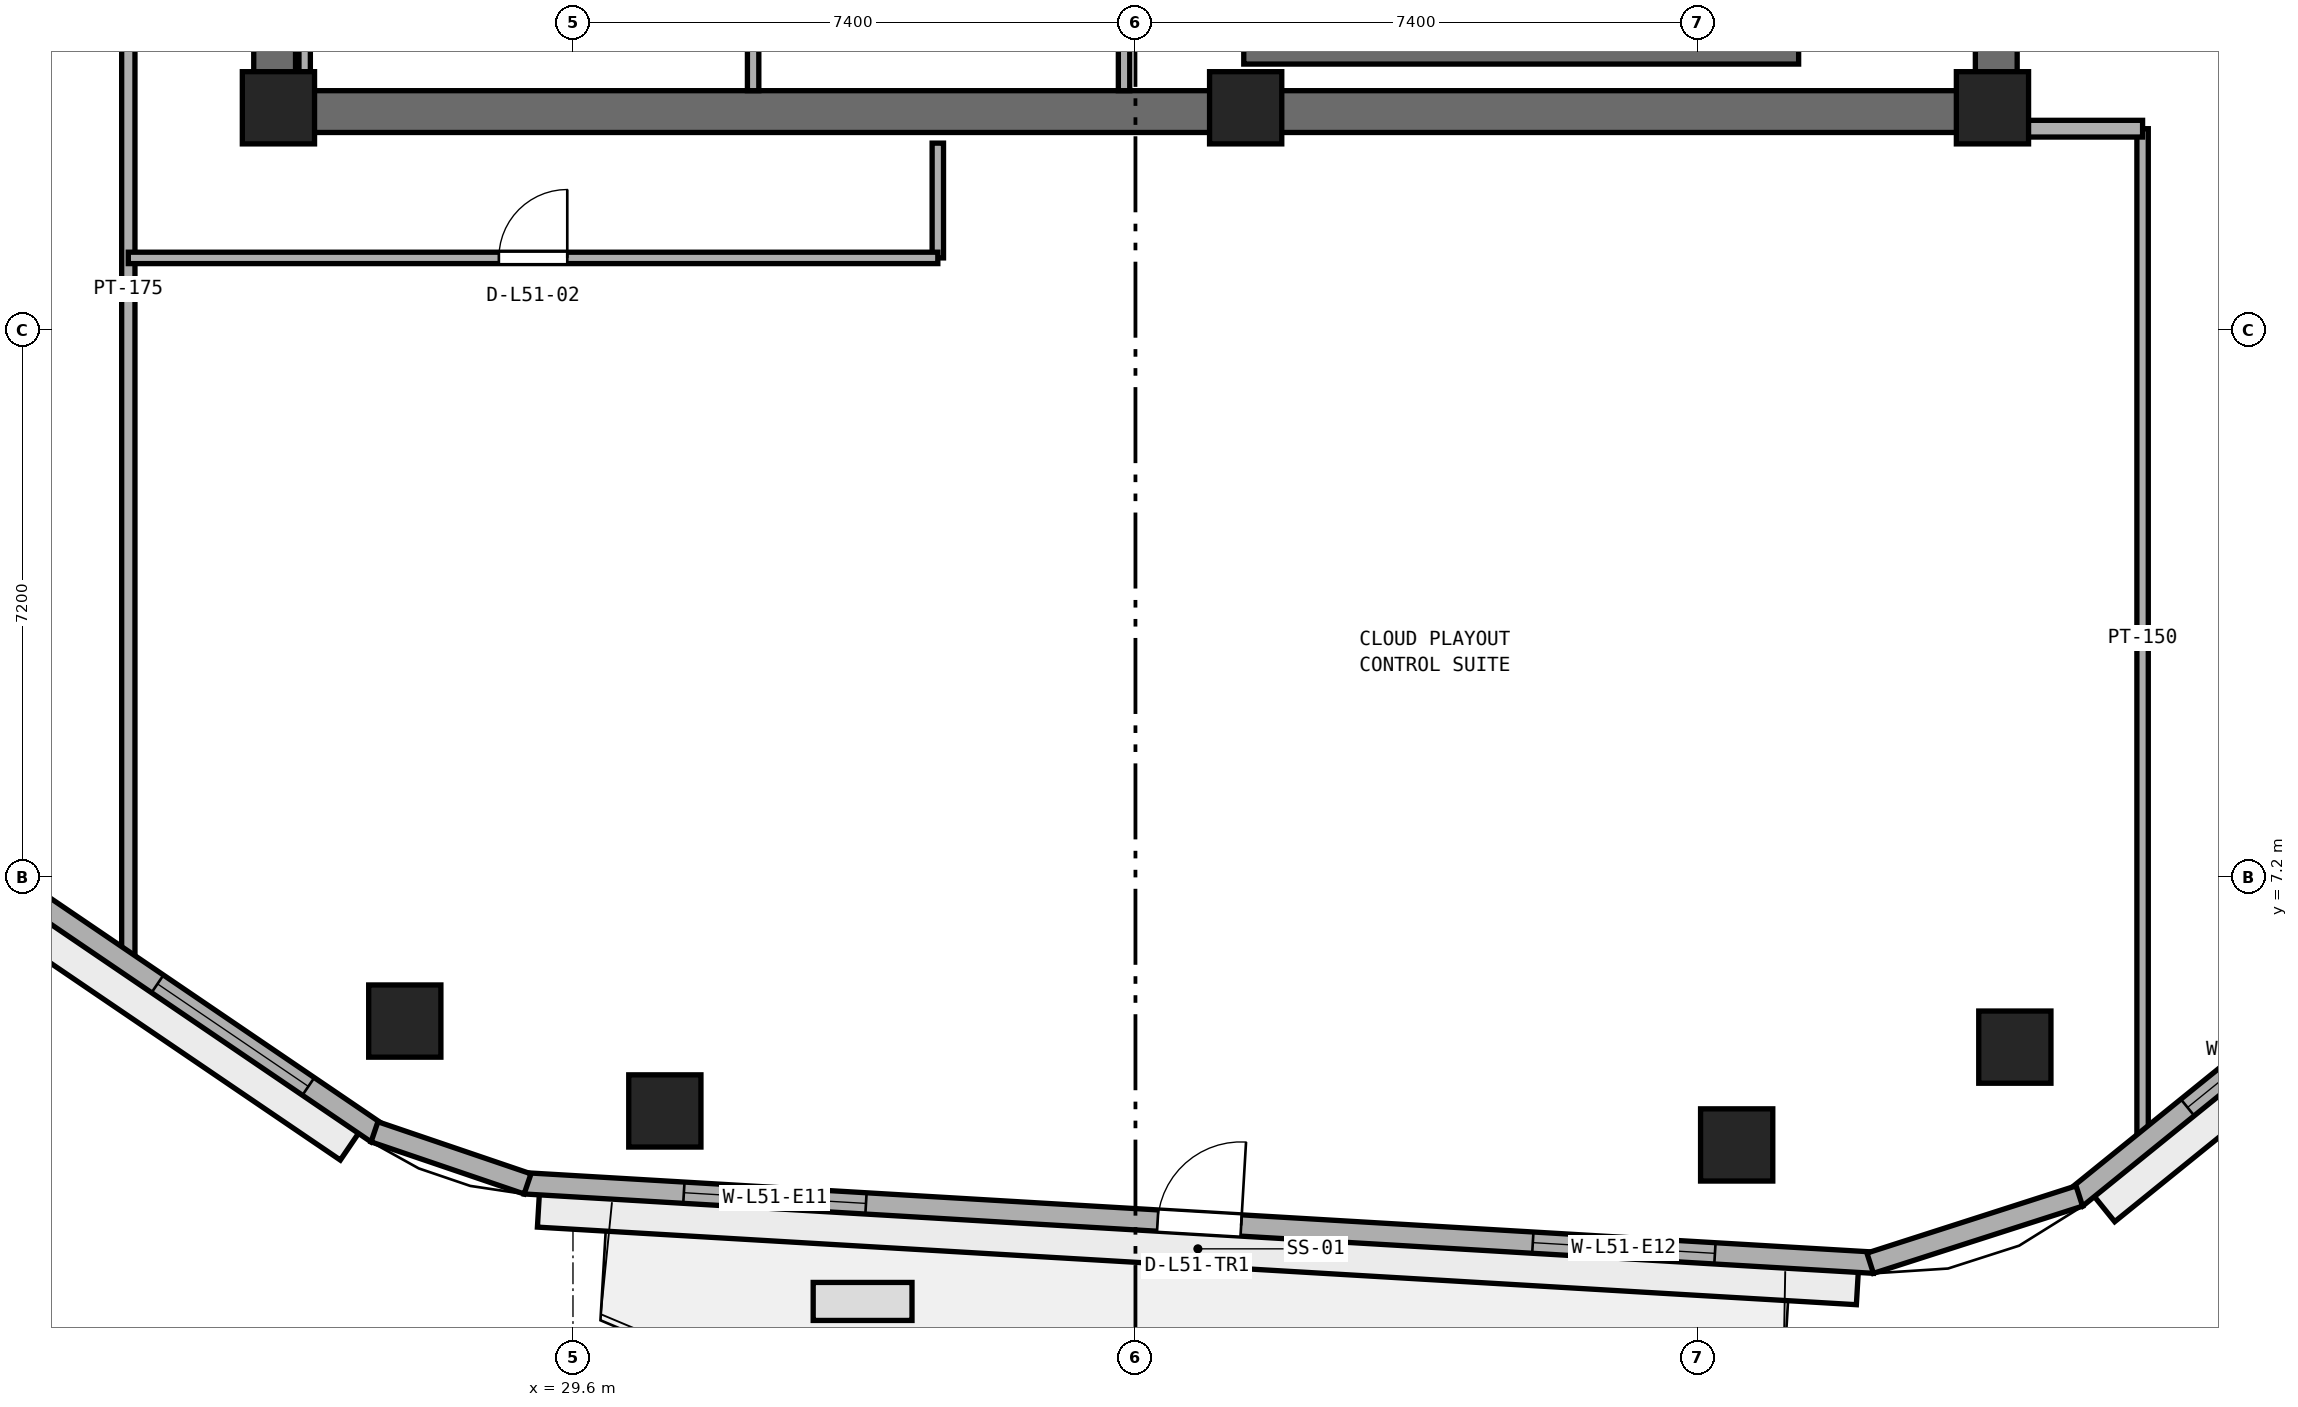
"""IFC4 building model, lengths in metres.
Left out: names, types, materials, properties, quantities, classifications, styles, units other than length and angle.
Written with IfcOpenShell. Run it as: python <this file> out.ifc"""

import sys

from ifc_helpers import new_model, si_unit, direction, frame, frame_2d, origin, origin_2d, place, context, subcontext, project, spatial, rectangle, extrude, element, fill, save


model = new_model("IFC4")
c1 = context("Model", 3, precision=1e-05, world=origin(), true_north=direction((0.0, 1.0)))
c2 = subcontext(c1, "Body", "Model", "MODEL_VIEW")
j1 = project(units=[si_unit("LENGTHUNIT", "METRE"), si_unit("PLANEANGLEUNIT", "RADIAN")], contexts=[c1])
p1 = place(None, origin())
s1 = spatial("IfcSite", under=j1, at=p1, CompositionType="ELEMENT")
p2 = place(p1, origin())
s2 = spatial("IfcBuilding", under=s1, at=p2, CompositionType="ELEMENT")
p3 = place(p2, frame((0.0, 0.0, 201.0)))
s3 = spatial("IfcBuildingStorey", under=s2, at=p3, CompositionType="ELEMENT", Elevation=201.0)
p4 = place(p3, frame((25.4, 17.275, 0.0), z_axis=(0.0, 0.0, 1.0), x_axis=(1.0, 0.0, 0.0)))
e1 = element("IfcWall", 1, at=p4, inside=s3, PredefinedType="SHEAR", context=c2, shape_type="SweptSolid", body=[
    extrude(rectangle(XDim=23.2, YDim=0.55, at=frame_2d((11.6, 0.0))), origin(), (0.0, 0.0, 1.0), 3.54),
])
p5 = place(p3, frame((25.675, 17.55, 0.0), z_axis=(0.0, 0.0, 1.0), x_axis=(0.0, 1.0, 0.0)))
e2 = element("IfcWall", 2, at=p5, inside=s3, PredefinedType="SHEAR", context=c2, shape_type="SweptSolid", body=[
    extrude(rectangle(XDim=15.3, YDim=0.55, at=frame_2d((7.65, 0.0))), origin(), (0.0, 0.0, 1.0), 3.54),
])
p6 = place(p5, frame((6.9, 0.0, 0.0)))
e3 = element("IfcOpeningElement", 3, at=p6, cuts=e2, PredefinedType="OPENING", context=c2, shape_type="SweptSolid", body=[
    extrude(rectangle(XDim=1.5, YDim=2.15, at=frame_2d((0.75, 1.075))), frame((0.0, 0.285, 0.0), z_axis=(0.0, -1.0, 0.0), x_axis=(1.0, 0.0, 0.0)), (0.0, 0.0, 1.0), 0.57),
])
p7 = place(p3, frame((48.325, 17.55, 0.0), z_axis=(0.0, 0.0, 1.0), x_axis=(0.0, 1.0, 0.0)))
e4 = element("IfcWall", 4, at=p7, inside=s3, PredefinedType="SHEAR", context=c2, shape_type="SweptSolid", body=[
    extrude(rectangle(XDim=15.3, YDim=0.55, at=frame_2d((7.65, 0.0))), origin(), (0.0, 0.0, 1.0), 3.54),
])
p8 = place(p7, frame((5.75, 0.0, 0.0)))
e5 = element("IfcOpeningElement", 5, at=p8, cuts=e4, PredefinedType="OPENING", context=c2, shape_type="SweptSolid", body=[
    extrude(rectangle(XDim=1.5, YDim=2.15, at=frame_2d((0.75, 1.075))), frame((0.0, 0.285, 0.0), z_axis=(0.0, -1.0, 0.0), x_axis=(1.0, 0.0, 0.0)), (0.0, 0.0, 1.0), 0.57),
])
for number, where, z_axis, x_axis in (
    (6, (25.725, 17.325, 0.0), (0.0, 0.0, 1.0), (1.0, 0.0, 0.0)),
    (7, (38.45, 17.325, 0.0), (0.0, 0.0, 1.0), (1.0, 0.0, 0.0)),
    (8, (48.275, 17.325, 0.0), (0.0, 0.0, 1.0), (1.0, 0.0, 0.0)),
):
    element("IfcColumn", number, at=place(p3, frame(where, z_axis=z_axis, x_axis=x_axis)), inside=s3, PredefinedType="PILASTER", context=c2, shape_type="SweptSolid", body=[
        extrude(rectangle(XDim=0.95, YDim=0.95, at=origin_2d()), origin(), (0.0, 0.0, 1.0), 3.8),
    ])
for number, where, z_axis, x_axis in (
    (9, (30.809, 4.127, 0.0), (0.0, 0.0, 1.0), (1.0, 0.0, 0.0)),
    (10, (44.91, 3.68, 0.0), (0.0, 0.0, 1.0), (1.0, 0.0, 0.0)),
    (11, (48.57, 4.967, 0.0), (0.0, 0.0, 1.0), (1.0, 0.0, 0.0)),
    (12, (27.387, 5.31, 0.0), (0.0, 0.0, 1.0), (1.0, 0.0, 0.0)),
):
    element("IfcColumn", number, at=place(p3, frame(where, z_axis=z_axis, x_axis=x_axis)), inside=s3, PredefinedType="COLUMN", context=c2, shape_type="SweptSolid", body=[
        extrude(rectangle(XDim=0.95, YDim=0.95, at=origin_2d()), origin(), (0.0, 0.0, 1.0), 3.8),
    ])
p9 = place(p3, frame((38.425, 18.025, 0.0), z_axis=(0.0, 0.0, 1.0), x_axis=(1.0, 0.0, 0.0)))
e13 = element("IfcWall", 13, at=p9, inside=s3, PredefinedType="SHEAR", context=c2, shape_type="SweptSolid", body=[
    extrude(rectangle(XDim=7.3, YDim=0.25, at=frame_2d((3.65, 0.0))), origin(), (0.0, 0.0, 1.0), 3.54),
])
p10 = place(p3, frame((26.07, 17.55, 0.0), z_axis=(0.0, 0.0, 1.0), x_axis=(0.0, 1.0, 0.0)))
e14 = element("IfcWall", 14, at=p10, inside=s3, PredefinedType="PARTITIONING", context=c2, shape_type="SweptSolid", body=[
    extrude(rectangle(XDim=2.2, YDim=0.15, at=frame_2d((1.1, 0.0))), origin(), (0.0, 0.0, 1.0), 2.64),
])
for number, where, z_axis, x_axis in (
    (15, (31.97, 17.55, 0.0), (0.0, 0.0, 1.0), (0.0, 1.0, 0.0)),
    (16, (36.85, 17.55, 0.0), (0.0, 0.0, 1.0), (0.0, 1.0, 0.0)),
):
    element("IfcWall", number, at=place(p3, frame(where, z_axis=z_axis, x_axis=x_axis)), inside=s3, PredefinedType="PARTITIONING", context=c2, shape_type="SweptSolid", body=[
        extrude(rectangle(XDim=2.2, YDim=0.15, at=frame_2d((1.1, 0.0))), origin(), (0.0, 0.0, 1.0), 3.54),
    ])
p11 = place(p3, frame((50.25, 3.654, 0.0), z_axis=(0.0, 0.0, 1.0), x_axis=(0.0, 1.0, 0.0)))
e17 = element("IfcWall", 17, at=p11, inside=s3, PredefinedType="PARTITIONING", context=c2, shape_type="SweptSolid", body=[
    extrude(rectangle(XDim=13.396, YDim=0.15, at=frame_2d((6.698, 0.0))), origin(), (0.0, 0.0, 1.0), 3.54),
])
p12 = place(p3, frame((34.4, 15.35, 0.0), z_axis=(0.0, 0.0, 1.0), x_axis=(0.0, 1.0, 0.0)))
e18 = element("IfcWall", 18, at=p12, inside=s3, PredefinedType="PARTITIONING", context=c2, shape_type="SweptSolid", body=[
    extrude(rectangle(XDim=1.51, YDim=0.15, at=frame_2d((0.755, 0.0))), origin(), (0.0, 0.0, 1.0), 3.54),
])
p13 = place(p3, frame((23.75, 6.031, 0.0), z_axis=(0.0, 0.0, 1.0), x_axis=(0.0, 1.0, 0.0)))
e19 = element("IfcWall", 19, at=p13, inside=s3, PredefinedType="PARTITIONING", context=c2, shape_type="SweptSolid", body=[
    extrude(rectangle(XDim=17.819, YDim=0.175, at=frame_2d((8.91, 0.0))), origin(), (0.0, 0.0, 1.0), 3.54),
])
p14 = place(p3, frame((23.75, 15.35, 0.0), z_axis=(0.0, 0.0, 1.0), x_axis=(1.0, 0.0, 0.0)))
e20 = element("IfcWall", 20, at=p14, inside=s3, PredefinedType="PARTITIONING", context=c2, shape_type="SweptSolid", body=[
    extrude(rectangle(XDim=10.65, YDim=0.15, at=frame_2d((5.325, 0.0))), origin(), (0.0, 0.0, 1.0), 3.54),
])
p15 = place(p14, frame((4.875, 0.0, 0.0)))
e21 = element("IfcOpeningElement", 21, at=p15, cuts=e20, PredefinedType="OPENING", context=c2, shape_type="SweptSolid", body=[
    extrude(rectangle(XDim=0.9, YDim=2.1, at=frame_2d((0.45, 1.05))), frame((0.0, 0.085, 0.0), z_axis=(0.0, -1.0, 0.0), x_axis=(1.0, 0.0, 0.0)), (0.0, 0.0, 1.0), 0.17),
])
p16 = place(p3, frame((48.74, 17.05, 0.0), z_axis=(0.0, 0.0, 1.0), x_axis=(1.0, 0.0, 0.0)))
e22 = element("IfcWall", 22, at=p16, inside=s3, PredefinedType="PARTITIONING", context=c2, shape_type="SweptSolid", body=[
    extrude(rectangle(XDim=1.51, YDim=0.22, at=frame_2d((0.755, 0.0))), origin(), (0.0, 0.0, 1.0), 2.923),
])
p17 = place(p3, frame((28.966, 3.175, 0.0), z_axis=(0.0, 0.0, 1.0), x_axis=(0.998274467859, -0.058720412304, 0.0)))
e23 = element("IfcWall", 23, at=p17, inside=s3, PredefinedType="STANDARD", context=c2, shape_type="SweptSolid", body=[
    extrude(rectangle(XDim=17.782, YDim=0.28, at=frame_2d((8.891, 0.0))), origin(), (0.0, 0.0, 1.0), 3.54),
])
p18 = place(p17, frame((8.341, 0.0, 0.0)))
e24 = element("IfcOpeningElement", 24, at=p18, cuts=e23, PredefinedType="OPENING", context=c2, shape_type="SweptSolid", body=[
    extrude(rectangle(XDim=1.1, YDim=2.2, at=frame_2d((0.55, 1.1))), frame((0.0, 0.15, 0.0), z_axis=(0.0, -1.0, 0.0), x_axis=(1.0, 0.0, 0.0)), (0.0, 0.0, 1.0), 0.3),
])
p19 = place(p17, frame((2.097, 0.0, 0.9)))
e25 = element("IfcOpeningElement", 25, at=p19, cuts=e23, PredefinedType="OPENING", context=c2, shape_type="SweptSolid", body=[
    extrude(rectangle(XDim=2.4, YDim=1.75, at=frame_2d((1.2, 0.875))), frame((0.0, 0.15, 0.0), z_axis=(0.0, -1.0, 0.0), x_axis=(1.0, 0.0, 0.0)), (0.0, 0.0, 1.0), 0.3),
])
p20 = place(p17, frame((13.285, 0.0, 0.9)))
e26 = element("IfcOpeningElement", 26, at=p20, cuts=e23, PredefinedType="OPENING", context=c2, shape_type="SweptSolid", body=[
    extrude(rectangle(XDim=2.4, YDim=1.75, at=frame_2d((1.2, 0.875))), frame((0.0, 0.15, 0.0), z_axis=(0.0, -1.0, 0.0), x_axis=(1.0, 0.0, 0.0)), (0.0, 0.0, 1.0), 0.3),
])
p21 = place(p3, frame((49.372, 2.984, 0.0), z_axis=(0.0, 0.0, 1.0), x_axis=(0.777278899851, 0.629156190343, 0.0)))
e27 = element("IfcWall", 27, at=p21, inside=s3, PredefinedType="STANDARD", context=c2, shape_type="SweptSolid", body=[
    extrude(rectangle(XDim=16.54, YDim=0.28, at=frame_2d((8.27, 0.0))), origin(), (0.0, 0.0, 1.0), 3.54),
])
p22 = place(p21, frame((1.89, 0.0, 0.9)))
e28 = element("IfcOpeningElement", 28, at=p22, cuts=e27, PredefinedType="OPENING", context=c2, shape_type="SweptSolid", body=[
    extrude(rectangle(XDim=2.4, YDim=1.75, at=frame_2d((1.2, 0.875))), frame((0.0, 0.15, 0.0), z_axis=(0.0, -1.0, 0.0), x_axis=(1.0, 0.0, 0.0)), (0.0, 0.0, 1.0), 0.3),
])
p23 = place(p21, frame((7.07, 0.0, 0.9)))
e29 = element("IfcOpeningElement", 29, at=p23, cuts=e27, PredefinedType="OPENING", context=c2, shape_type="SweptSolid", body=[
    extrude(rectangle(XDim=2.4, YDim=1.75, at=frame_2d((1.2, 0.875))), frame((0.0, 0.15, 0.0), z_axis=(0.0, -1.0, 0.0), x_axis=(1.0, 0.0, 0.0)), (0.0, 0.0, 1.0), 0.3),
])
p24 = place(p21, frame((12.25, 0.0, 0.9)))
e30 = element("IfcOpeningElement", 30, at=p24, cuts=e27, PredefinedType="OPENING", context=c2, shape_type="SweptSolid", body=[
    extrude(rectangle(XDim=2.4, YDim=1.75, at=frame_2d((1.2, 0.875))), frame((0.0, 0.15, 0.0), z_axis=(0.0, -1.0, 0.0), x_axis=(1.0, 0.0, 0.0)), (0.0, 0.0, 1.0), 0.3),
])
p25 = place(p3, frame((13.43, 13.075, 0.0), z_axis=(0.0, 0.0, 1.0), x_axis=(0.827025402003, -0.562164552815, 0.0)))
e31 = element("IfcWall", 31, at=p25, inside=s3, PredefinedType="STANDARD", context=c2, shape_type="SweptSolid", body=[
    extrude(rectangle(XDim=16.435, YDim=0.28, at=frame_2d((8.218, 0.0))), origin(), (0.0, 0.0, 1.0), 3.54),
])
p26 = place(p25, frame((1.873, 0.0, 0.9)))
e32 = element("IfcOpeningElement", 32, at=p26, cuts=e31, PredefinedType="OPENING", context=c2, shape_type="SweptSolid", body=[
    extrude(rectangle(XDim=2.4, YDim=1.75, at=frame_2d((1.2, 0.875))), frame((0.0, 0.15, 0.0), z_axis=(0.0, -1.0, 0.0), x_axis=(1.0, 0.0, 0.0)), (0.0, 0.0, 1.0), 0.3),
])
p27 = place(p25, frame((7.018, 0.0, 0.9)))
e33 = element("IfcOpeningElement", 33, at=p27, cuts=e31, PredefinedType="OPENING", context=c2, shape_type="SweptSolid", body=[
    extrude(rectangle(XDim=2.4, YDim=1.75, at=frame_2d((1.2, 0.875))), frame((0.0, 0.15, 0.0), z_axis=(0.0, -1.0, 0.0), x_axis=(1.0, 0.0, 0.0)), (0.0, 0.0, 1.0), 0.3),
])
p28 = place(p25, frame((12.943, 0.0, 0.9)))
e34 = element("IfcOpeningElement", 34, at=p28, cuts=e31, PredefinedType="OPENING", context=c2, shape_type="SweptSolid", body=[
    extrude(rectangle(XDim=2.4, YDim=1.75, at=frame_2d((1.2, 0.875))), frame((0.0, 0.15, 0.0), z_axis=(0.0, -1.0, 0.0), x_axis=(1.0, 0.0, 0.0)), (0.0, 0.0, 1.0), 0.3),
])
p29 = place(p3, frame((46.666, 2.124, 0.0), z_axis=(0.0, 0.0, 1.0), x_axis=(0.952065470694, 0.305894327363, 0.0)))
e35 = element("IfcWall", 35, at=p29, inside=s3, PredefinedType="STANDARD", context=c2, shape_type="SweptSolid", body=[
    extrude(rectangle(XDim=2.89, YDim=0.28, at=frame_2d((1.445, 0.0))), origin(), (0.0, 0.0, 1.0), 3.54),
])
p30 = place(p3, frame((26.989, 3.853, 0.0), z_axis=(0.0, 0.0, 1.0), x_axis=(0.946713959835, -0.322075578479, 0.0)))
e36 = element("IfcWall", 36, at=p30, inside=s3, PredefinedType="STANDARD", context=c2, shape_type="SweptSolid", body=[
    extrude(rectangle(XDim=2.127, YDim=0.28, at=frame_2d((1.063, 0.0))), origin(), (0.0, 0.0, 1.0), 3.54),
])
p31 = place(p15, origin())
e37 = element("IfcDoor", 37, at=p31, inside=s3, OperationType="SINGLE_SWING_RIGHT", PredefinedType="DOOR", context=c2, shape_type="SweptSolid", body=[
    extrude(rectangle(XDim=0.9, YDim=2.1, at=frame_2d((0.45, 1.05))), frame((0.0, 0.025, 0.0), z_axis=(0.0, -1.0, 0.0), x_axis=(1.0, 0.0, 0.0)), (0.0, 0.0, 1.0), 0.05),
])
fill(e21, e37)
p32 = place(p18, origin())
e38 = element("IfcDoor", 38, at=p32, inside=s3, OperationType="SINGLE_SWING_RIGHT", PredefinedType="DOOR", context=c2, shape_type="SweptSolid", body=[
    extrude(rectangle(XDim=1.1, YDim=2.2, at=frame_2d((0.55, 1.1))), frame((0.0, 0.025, 0.0), z_axis=(0.0, -1.0, 0.0), x_axis=(1.0, 0.0, 0.0)), (0.0, 0.0, 1.0), 0.05),
])
fill(e24, e38)
p33 = place(p19, origin())
e39 = element("IfcWindow", 39, at=p33, inside=s3, PartitioningType="SINGLE_PANEL", PredefinedType="WINDOW", context=c2, shape_type="SweptSolid", body=[
    extrude(rectangle(XDim=2.4, YDim=1.75, at=frame_2d((1.2, 0.875))), frame((0.0, 0.03, 0.0), z_axis=(0.0, -1.0, 0.0), x_axis=(1.0, 0.0, 0.0)), (0.0, 0.0, 1.0), 0.06),
])
fill(e25, e39)
p34 = place(p20, origin())
e40 = element("IfcWindow", 40, at=p34, inside=s3, PartitioningType="SINGLE_PANEL", PredefinedType="WINDOW", context=c2, shape_type="SweptSolid", body=[
    extrude(rectangle(XDim=2.4, YDim=1.75, at=frame_2d((1.2, 0.875))), frame((0.0, 0.03, 0.0), z_axis=(0.0, -1.0, 0.0), x_axis=(1.0, 0.0, 0.0)), (0.0, 0.0, 1.0), 0.06),
])
fill(e26, e40)
p35 = place(p22, origin())
e41 = element("IfcWindow", 41, at=p35, inside=s3, PartitioningType="SINGLE_PANEL", PredefinedType="WINDOW", context=c2, shape_type="SweptSolid", body=[
    extrude(rectangle(XDim=2.4, YDim=1.75, at=frame_2d((1.2, 0.875))), frame((0.0, 0.03, 0.0), z_axis=(0.0, -1.0, 0.0), x_axis=(1.0, 0.0, 0.0)), (0.0, 0.0, 1.0), 0.06),
])
fill(e28, e41)
p36 = place(p28, origin())
e42 = element("IfcWindow", 42, at=p36, inside=s3, PartitioningType="SINGLE_PANEL", PredefinedType="WINDOW", context=c2, shape_type="SweptSolid", body=[
    extrude(rectangle(XDim=2.4, YDim=1.75, at=frame_2d((1.2, 0.875))), frame((0.0, 0.03, 0.0), z_axis=(0.0, -1.0, 0.0), x_axis=(1.0, 0.0, 0.0)), (0.0, 0.0, 1.0), 0.06),
])
fill(e34, e42)
save(model, sys.argv[1])
